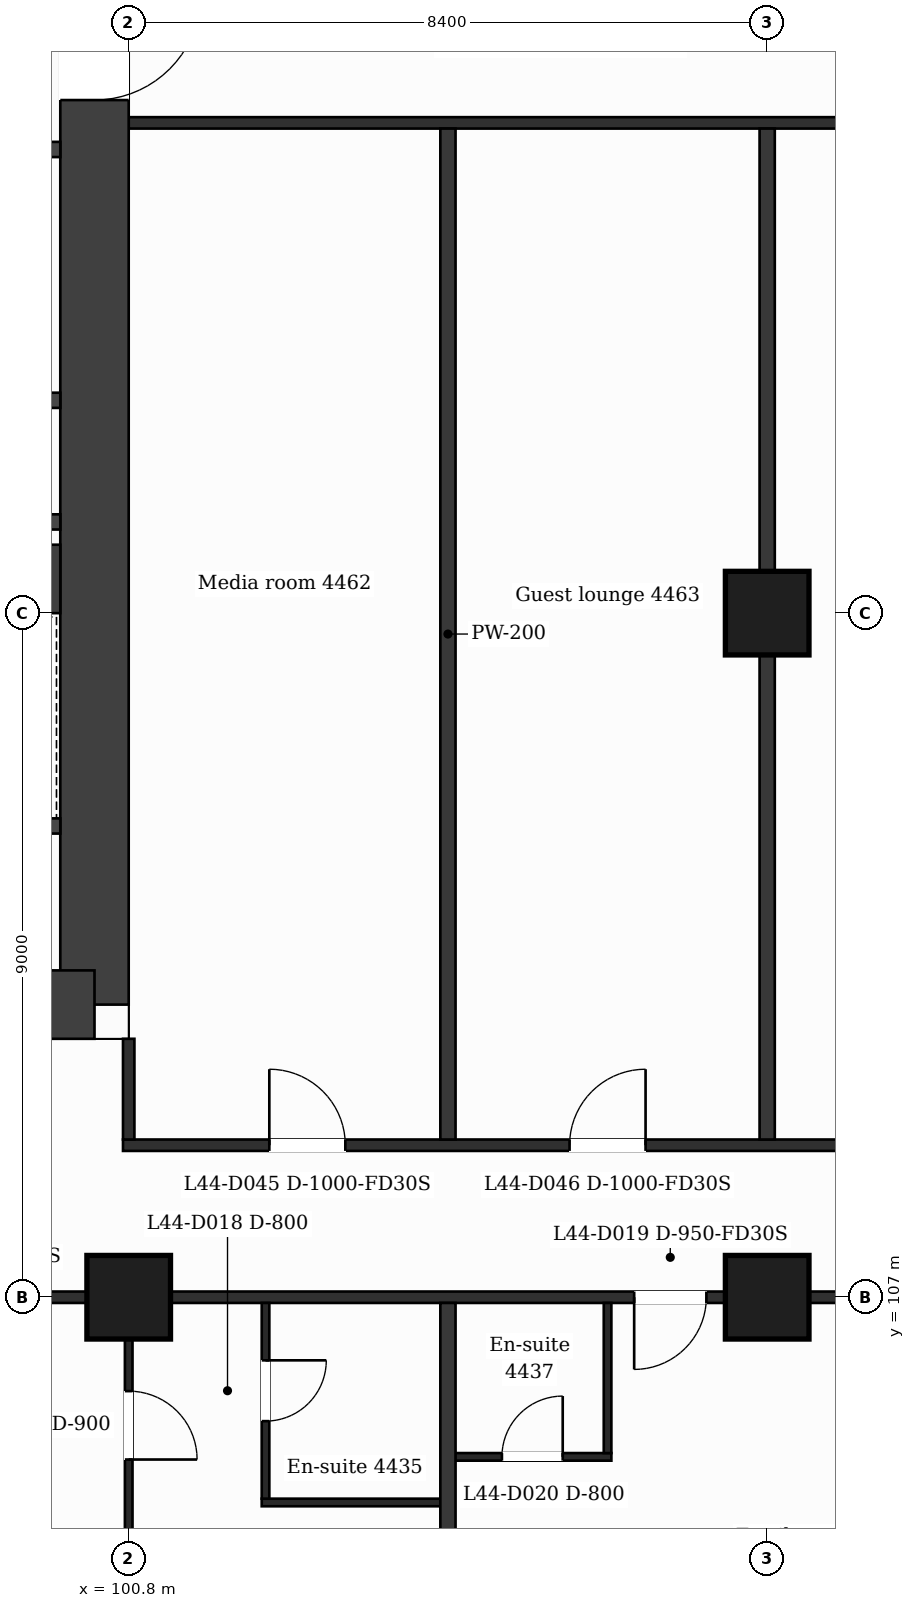
"""IFC4 building model, lengths in metres.
Left out: names, types, materials, properties, quantities, classifications, styles, units other than length and angle.
Written with IfcOpenShell. Run it as: python <this file> out.ifc"""

import sys

from ifc_helpers import new_model, si_unit, direction, frame, frame_2d, origin, origin_2d, place, context, subcontext, project, spatial, rectangle, extrude, element, fill, save


model = new_model("IFC4")
c1 = context("Model", 3, precision=1e-05, world=origin(), true_north=direction((0.0, 1.0)))
c2 = subcontext(c1, "Body", "Model", "MODEL_VIEW")
j1 = project(units=[si_unit("LENGTHUNIT", "METRE"), si_unit("PLANEANGLEUNIT", "RADIAN")], contexts=[c1])
p1 = place(None, origin())
s1 = spatial("IfcSite", under=j1, at=p1, CompositionType="ELEMENT")
p2 = place(p1, origin())
s2 = spatial("IfcBuilding", under=s1, at=p2, CompositionType="ELEMENT")
p3 = place(p2, frame((0.0, 0.0, 184.8)))
s3 = spatial("IfcBuildingStorey", under=s2, at=p3, CompositionType="ELEMENT", Elevation=184.8)
p4 = place(p3, frame((100.35, 131.95, 0.0), z_axis=(0.0, 0.0, 1.0), x_axis=(0.0, -1.0, 0.0)))
e1 = element("IfcWall", 1, at=p4, inside=s3, PredefinedType="SHEAR", context=c2, shape_type="SweptSolid", body=[
    extrude(rectangle(XDim=21.1, YDim=0.9, at=frame_2d((10.55, 0.0))), origin(), (0.0, 0.0, 1.0), 3.7),
])
p5 = place(p4, frame((7.8, 0.0, 0.0)))
e2 = element("IfcOpeningElement", 2, at=p5, cuts=e1, PredefinedType="OPENING", context=c2, shape_type="SweptSolid", body=[
    extrude(rectangle(XDim=1.4, YDim=2.1, at=frame_2d((0.7, 1.05))), frame((0.0, 0.46, 0.0), z_axis=(0.0, -1.0, 0.0), x_axis=(1.0, 0.0, 0.0)), (0.0, 0.0, 1.0), 0.92),
])
p6 = place(p3, frame((100.35, 110.85, 0.0), z_axis=(0.0, 0.0, 1.0), x_axis=(-1.0, 0.0, 0.0)))
e3 = element("IfcWall", 3, at=p6, inside=s3, PredefinedType="SHEAR", context=c2, shape_type="SweptSolid", body=[
    extrude(rectangle(XDim=14.166, YDim=0.9, at=frame_2d((7.083, 0.0))), origin(), (0.0, 0.0, 1.0), 3.7),
])
p7 = place(p6, frame((5.855, 0.0, 0.0)))
e4 = element("IfcOpeningElement", 4, at=p7, cuts=e3, PredefinedType="OPENING", context=c2, shape_type="SweptSolid", body=[
    extrude(rectangle(XDim=1.4, YDim=2.1, at=frame_2d((0.7, 1.05))), frame((0.0, 0.46, 0.0), z_axis=(0.0, -1.0, 0.0), x_axis=(1.0, 0.0, 0.0)), (0.0, 0.0, 1.0), 0.92),
])
p8 = place(p3, frame((94.8, 116.45, 0.0), z_axis=(0.0, 0.0, 1.0), x_axis=(1.0, 0.0, 0.0)))
e5 = element("IfcWall", 5, at=p8, inside=s3, PredefinedType="SHEAR", context=c2, shape_type="SweptSolid", body=[
    extrude(rectangle(XDim=5.1, YDim=0.9, at=frame_2d((2.55, 0.0))), origin(), (0.0, 0.0, 1.0), 3.7),
])
for number, where, z_axis, x_axis in (
    (6, (100.8, 107.0, 0.0), (0.0, 0.0, 1.0), (1.0, 0.0, 0.0)),
    (7, (109.2, 107.0, 0.0), (0.0, 0.0, 1.0), (1.0, 0.0, 0.0)),
    (8, (109.2, 116.0, 0.0), (0.0, 0.0, 1.0), (1.0, 0.0, 0.0)),
):
    element("IfcColumn", number, at=place(p3, frame(where, z_axis=z_axis, x_axis=x_axis)), inside=s3, PredefinedType="COLUMN", context=c2, shape_type="SweptSolid", body=[
        extrude(rectangle(XDim=1.1, YDim=1.1, at=origin_2d()), origin(), (0.0, 0.0, 1.0), 3.7),
    ])
p9 = place(p3, frame((102.55, 104.3, 0.0), z_axis=(0.0, 0.0, 1.0), x_axis=(1.0, 0.0, 0.0)))
e9 = element("IfcWall", 9, at=p9, inside=s3, PredefinedType="PARTITIONING", context=c2, shape_type="SweptSolid", body=[
    extrude(rectangle(XDim=2.45, YDim=0.1, at=frame_2d((1.225, 0.0))), origin(), (0.0, 0.0, 1.0), 3.38),
])
p10 = place(p3, frame((105.0, 104.9, 0.0), z_axis=(0.0, 0.0, 1.0), x_axis=(1.0, 0.0, 0.0)))
e10 = element("IfcWall", 10, at=p10, inside=s3, PredefinedType="PARTITIONING", context=c2, shape_type="SweptSolid", body=[
    extrude(rectangle(XDim=2.15, YDim=0.1, at=frame_2d((1.075, 0.0))), origin(), (0.0, 0.0, 1.0), 3.38),
])
p11 = place(p10, frame((0.71, 0.0, 0.0)))
e11 = element("IfcOpeningElement", 11, at=p11, cuts=e10, PredefinedType="OPENING", context=c2, shape_type="SweptSolid", body=[
    extrude(rectangle(XDim=0.8, YDim=2.1, at=frame_2d((0.4, 1.05))), frame((0.0, 0.06, 0.0), z_axis=(0.0, -1.0, 0.0), x_axis=(1.0, 0.0, 0.0)), (0.0, 0.0, 1.0), 0.12),
])
p12 = place(p3, frame((87.018, 107.0, 0.0), z_axis=(0.0, 0.0, 1.0), x_axis=(1.0, 0.0, 0.0)))
e12 = element("IfcWall", 12, at=p12, inside=s3, PredefinedType="PARTITIONING", context=c2, shape_type="SweptSolid", body=[
    extrude(rectangle(XDim=52.765, YDim=0.15, at=frame_2d((26.382, 0.0))), origin(), (0.0, 0.0, 1.0), 3.38),
])
p13 = place(p12, frame((0.87, 0.0, 0.0)))
e13 = element("IfcOpeningElement", 13, at=p13, cuts=e12, PredefinedType="OPENING", context=c2, shape_type="SweptSolid", body=[
    extrude(rectangle(XDim=0.95, YDim=2.1, at=frame_2d((0.475, 1.05))), frame((0.0, 0.085, 0.0), z_axis=(0.0, -1.0, 0.0), x_axis=(1.0, 0.0, 0.0)), (0.0, 0.0, 1.0), 0.17),
])
p14 = place(p12, frame((10.757, 0.0, 0.0)))
e14 = element("IfcOpeningElement", 14, at=p14, cuts=e12, PredefinedType="OPENING", context=c2, shape_type="SweptSolid", body=[
    extrude(rectangle(XDim=1.0, YDim=2.1, at=frame_2d((0.5, 1.05))), frame((0.0, 0.085, 0.0), z_axis=(0.0, -1.0, 0.0), x_axis=(1.0, 0.0, 0.0)), (0.0, 0.0, 1.0), 0.17),
])
p15 = place(p12, frame((20.432, 0.0, 0.0)))
e15 = element("IfcOpeningElement", 15, at=p15, cuts=e12, PredefinedType="OPENING", context=c2, shape_type="SweptSolid", body=[
    extrude(rectangle(XDim=0.95, YDim=2.1, at=frame_2d((0.475, 1.05))), frame((0.0, 0.085, 0.0), z_axis=(0.0, -1.0, 0.0), x_axis=(1.0, 0.0, 0.0)), (0.0, 0.0, 1.0), 0.17),
])
p16 = place(p12, frame((27.752, 0.0, 0.0)))
e16 = element("IfcOpeningElement", 16, at=p16, cuts=e12, PredefinedType="OPENING", context=c2, shape_type="SweptSolid", body=[
    extrude(rectangle(XDim=0.95, YDim=2.1, at=frame_2d((0.475, 1.05))), frame((0.0, 0.085, 0.0), z_axis=(0.0, -1.0, 0.0), x_axis=(1.0, 0.0, 0.0)), (0.0, 0.0, 1.0), 0.17),
])
p17 = place(p12, frame((33.557, 0.0, 0.0)))
e17 = element("IfcOpeningElement", 17, at=p17, cuts=e12, PredefinedType="OPENING", context=c2, shape_type="SweptSolid", body=[
    extrude(rectangle(XDim=0.95, YDim=2.1, at=frame_2d((0.475, 1.05))), frame((0.0, 0.085, 0.0), z_axis=(0.0, -1.0, 0.0), x_axis=(1.0, 0.0, 0.0)), (0.0, 0.0, 1.0), 0.17),
])
p18 = place(p12, frame((35.057, 0.0, 0.0)))
e18 = element("IfcOpeningElement", 18, at=p18, cuts=e12, PredefinedType="OPENING", context=c2, shape_type="SweptSolid", body=[
    extrude(rectangle(XDim=0.95, YDim=2.1, at=frame_2d((0.475, 1.05))), frame((0.0, 0.085, 0.0), z_axis=(0.0, -1.0, 0.0), x_axis=(1.0, 0.0, 0.0)), (0.0, 0.0, 1.0), 0.17),
])
p19 = place(p12, frame((45.407, 0.0, 0.0)))
e19 = element("IfcOpeningElement", 19, at=p19, cuts=e12, PredefinedType="OPENING", context=c2, shape_type="SweptSolid", body=[
    extrude(rectangle(XDim=1.0, YDim=2.1, at=frame_2d((0.5, 1.05))), frame((0.0, 0.085, 0.0), z_axis=(0.0, -1.0, 0.0), x_axis=(1.0, 0.0, 0.0)), (0.0, 0.0, 1.0), 0.17),
])
p20 = place(p12, frame((49.285, 0.0, 0.0)))
e20 = element("IfcOpeningElement", 20, at=p20, cuts=e12, PredefinedType="OPENING", context=c2, shape_type="SweptSolid", body=[
    extrude(rectangle(XDim=0.95, YDim=2.1, at=frame_2d((0.475, 1.05))), frame((0.0, 0.085, 0.0), z_axis=(0.0, -1.0, 0.0), x_axis=(1.0, 0.0, 0.0)), (0.0, 0.0, 1.0), 0.17),
])
p21 = place(p3, frame((100.725, 109.0, 0.0), z_axis=(0.0, 0.0, 1.0), x_axis=(1.0, 0.0, 0.0)))
e21 = element("IfcWall", 21, at=p21, inside=s3, PredefinedType="PARTITIONING", context=c2, shape_type="SweptSolid", body=[
    extrude(rectangle(XDim=25.35, YDim=0.15, at=frame_2d((12.675, 0.0))), origin(), (0.0, 0.0, 1.0), 3.38),
])
p22 = place(p21, frame((1.925, 0.0, 0.0)))
e22 = element("IfcOpeningElement", 22, at=p22, cuts=e21, PredefinedType="OPENING", context=c2, shape_type="SweptSolid", body=[
    extrude(rectangle(XDim=1.0, YDim=2.1, at=frame_2d((0.5, 1.05))), frame((0.0, 0.085, 0.0), z_axis=(0.0, -1.0, 0.0), x_axis=(1.0, 0.0, 0.0)), (0.0, 0.0, 1.0), 0.17),
])
p23 = place(p21, frame((5.875, 0.0, 0.0)))
e23 = element("IfcOpeningElement", 23, at=p23, cuts=e21, PredefinedType="OPENING", context=c2, shape_type="SweptSolid", body=[
    extrude(rectangle(XDim=1.0, YDim=2.1, at=frame_2d((0.5, 1.05))), frame((0.0, 0.085, 0.0), z_axis=(0.0, -1.0, 0.0), x_axis=(1.0, 0.0, 0.0)), (0.0, 0.0, 1.0), 0.17),
])
p24 = place(p21, frame((12.845, 0.0, 0.0)))
e24 = element("IfcOpeningElement", 24, at=p24, cuts=e21, PredefinedType="OPENING", context=c2, shape_type="SweptSolid", body=[
    extrude(rectangle(XDim=1.0, YDim=2.1, at=frame_2d((0.5, 1.05))), frame((0.0, 0.085, 0.0), z_axis=(0.0, -1.0, 0.0), x_axis=(1.0, 0.0, 0.0)), (0.0, 0.0, 1.0), 0.17),
])
p25 = place(p21, frame((22.25, 0.0, 0.0)))
e25 = element("IfcOpeningElement", 25, at=p25, cuts=e21, PredefinedType="OPENING", context=c2, shape_type="SweptSolid", body=[
    extrude(rectangle(XDim=1.0, YDim=2.1, at=frame_2d((0.5, 1.05))), frame((0.0, 0.085, 0.0), z_axis=(0.0, -1.0, 0.0), x_axis=(1.0, 0.0, 0.0)), (0.0, 0.0, 1.0), 0.17),
])
p26 = place(p3, frame((95.127, 113.2, 0.0), z_axis=(0.0, 0.0, 1.0), x_axis=(1.0, 0.0, 0.0)))
e26 = element("IfcWall", 26, at=p26, inside=s3, PredefinedType="PARTITIONING", context=c2, shape_type="SweptSolid", body=[
    extrude(rectangle(XDim=4.773, YDim=0.2, at=frame_2d((2.386, 0.0))), origin(), (0.0, 0.0, 1.0), 3.38),
])
p27 = place(p26, frame((3.001, 0.0, 0.0)))
e27 = element("IfcOpeningElement", 27, at=p27, cuts=e26, PredefinedType="OPENING", context=c2, shape_type="SweptSolid", body=[
    extrude(rectangle(XDim=1.1, YDim=2.1, at=frame_2d((0.55, 1.05))), frame((0.0, 0.11, 0.0), z_axis=(0.0, -1.0, 0.0), x_axis=(1.0, 0.0, 0.0)), (0.0, 0.0, 1.0), 0.22),
])
for number, where, z_axis, x_axis in (
    (28, (95.227, 117.2, 0.0), (0.0, 0.0, 1.0), (1.0, 0.0, 0.0)),
    (29, (95.227, 118.8, 0.0), (0.0, 0.0, 1.0), (1.0, 0.0, 0.0)),
):
    element("IfcWall", number, at=place(p3, frame(where, z_axis=z_axis, x_axis=x_axis)), inside=s3, PredefinedType="PARTITIONING", context=c2, shape_type="SweptSolid", body=[
        extrude(rectangle(XDim=4.673, YDim=0.2, at=frame_2d((2.336, 0.0))), origin(), (0.0, 0.0, 1.0), 3.38),
    ])
p28 = place(p3, frame((95.227, 122.1, 0.0), z_axis=(0.0, 0.0, 1.0), x_axis=(1.0, 0.0, 0.0)))
e30 = element("IfcWall", 30, at=p28, inside=s3, PredefinedType="PARTITIONING", context=c2, shape_type="SweptSolid", body=[
    extrude(rectangle(XDim=4.673, YDim=0.2, at=frame_2d((2.336, 0.0))), origin(), (0.0, 0.0, 1.0), 3.38),
])
p29 = place(p28, frame((1.579, 0.0, 0.0)))
e31 = element("IfcOpeningElement", 31, at=p29, cuts=e30, PredefinedType="OPENING", context=c2, shape_type="SweptSolid", body=[
    extrude(rectangle(XDim=0.9, YDim=2.1, at=frame_2d((0.45, 1.05))), frame((0.0, 0.11, 0.0), z_axis=(0.0, -1.0, 0.0), x_axis=(1.0, 0.0, 0.0)), (0.0, 0.0, 1.0), 0.22),
])
p30 = place(p3, frame((100.8, 122.45, 0.0), z_axis=(0.0, 0.0, 1.0), x_axis=(1.0, 0.0, 0.0)))
e32 = element("IfcWall", 32, at=p30, inside=s3, PredefinedType="PARTITIONING", context=c2, shape_type="SweptSolid", body=[
    extrude(rectangle(XDim=25.2, YDim=0.15, at=frame_2d((12.6, 0.0))), origin(), (0.0, 0.0, 1.0), 3.38),
])
p31 = place(p3, frame((100.8, 99.79, 0.0), z_axis=(0.0, 0.0, 1.0), x_axis=(0.0, 1.0, 0.0)))
e33 = element("IfcWall", 33, at=p31, inside=s3, PredefinedType="PARTITIONING", context=c2, shape_type="SweptSolid", body=[
    extrude(rectangle(XDim=7.135, YDim=0.1, at=frame_2d((3.567, 0.0))), origin(), (0.0, 0.0, 1.0), 3.38),
])
p32 = place(p31, frame((5.075, 0.0, 0.0)))
e34 = element("IfcOpeningElement", 34, at=p32, cuts=e33, PredefinedType="OPENING", context=c2, shape_type="SweptSolid", body=[
    extrude(rectangle(XDim=0.9, YDim=2.1, at=frame_2d((0.45, 1.05))), frame((0.0, 0.06, 0.0), z_axis=(0.0, -1.0, 0.0), x_axis=(1.0, 0.0, 0.0)), (0.0, 0.0, 1.0), 0.12),
])
p33 = place(p3, frame((100.8, 109.075, 0.0), z_axis=(0.0, 0.0, 1.0), x_axis=(0.0, 1.0, 0.0)))
e35 = element("IfcWall", 35, at=p33, inside=s3, PredefinedType="PARTITIONING", context=c2, shape_type="SweptSolid", body=[
    extrude(rectangle(XDim=1.325, YDim=0.15, at=frame_2d((0.663, 0.0))), origin(), (0.0, 0.0, 1.0), 3.38),
])
p34 = place(p3, frame((102.6, 104.35, 0.0), z_axis=(0.0, 0.0, 1.0), x_axis=(0.0, 1.0, 0.0)))
e36 = element("IfcWall", 36, at=p34, inside=s3, PredefinedType="PARTITIONING", context=c2, shape_type="SweptSolid", body=[
    extrude(rectangle(XDim=2.575, YDim=0.1, at=frame_2d((1.288, 0.0))), origin(), (0.0, 0.0, 1.0), 3.38),
])
p35 = place(p34, frame((1.02, 0.0, 0.0)))
e37 = element("IfcOpeningElement", 37, at=p35, cuts=e36, PredefinedType="OPENING", context=c2, shape_type="SweptSolid", body=[
    extrude(rectangle(XDim=0.8, YDim=2.1, at=frame_2d((0.4, 1.05))), frame((0.0, 0.06, 0.0), z_axis=(0.0, -1.0, 0.0), x_axis=(1.0, 0.0, 0.0)), (0.0, 0.0, 1.0), 0.12),
])
p36 = place(p3, frame((105.0, 99.79, 0.0), z_axis=(0.0, 0.0, 1.0), x_axis=(0.0, 1.0, 0.0)))
e38 = element("IfcWall", 38, at=p36, inside=s3, PredefinedType="PARTITIONING", context=c2, shape_type="SweptSolid", body=[
    extrude(rectangle(XDim=7.135, YDim=0.2, at=frame_2d((3.567, 0.0))), origin(), (0.0, 0.0, 1.0), 3.38),
])
p37 = place(p3, frame((105.0, 109.075, 0.0), z_axis=(0.0, 0.0, 1.0), x_axis=(0.0, 1.0, 0.0)))
e39 = element("IfcWall", 39, at=p37, inside=s3, PredefinedType="PARTITIONING", context=c2, shape_type="SweptSolid", body=[
    extrude(rectangle(XDim=13.3, YDim=0.2, at=frame_2d((6.65, 0.0))), origin(), (0.0, 0.0, 1.0), 3.38),
])
p38 = place(p3, frame((107.1, 104.95, 0.0), z_axis=(0.0, 0.0, 1.0), x_axis=(0.0, 1.0, 0.0)))
e40 = element("IfcWall", 40, at=p38, inside=s3, PredefinedType="PARTITIONING", context=c2, shape_type="SweptSolid", body=[
    extrude(rectangle(XDim=1.975, YDim=0.1, at=frame_2d((0.988, 0.0))), origin(), (0.0, 0.0, 1.0), 3.38),
])
p39 = place(p3, frame((109.2, 109.075, 0.0), z_axis=(0.0, 0.0, 1.0), x_axis=(0.0, 1.0, 0.0)))
e41 = element("IfcWall", 41, at=p39, inside=s3, PredefinedType="PARTITIONING", context=c2, shape_type="SweptSolid", body=[
    extrude(rectangle(XDim=13.3, YDim=0.2, at=frame_2d((6.65, 0.0))), origin(), (0.0, 0.0, 1.0), 3.38),
])
p40 = place(p32, origin())
e42 = element("IfcDoor", 42, at=p40, inside=s3, OperationType="SINGLE_SWING_LEFT", PredefinedType="DOOR", context=c2, shape_type="SweptSolid", body=[
    extrude(rectangle(XDim=0.9, YDim=2.1, at=frame_2d((0.45, 1.05))), frame((0.0, 0.025, 0.0), z_axis=(0.0, -1.0, 0.0), x_axis=(1.0, 0.0, 0.0)), (0.0, 0.0, 1.0), 0.05),
])
fill(e34, e42)
p41 = place(p35, origin())
e43 = element("IfcDoor", 43, at=p41, inside=s3, OperationType="SINGLE_SWING_RIGHT", PredefinedType="DOOR", context=c2, shape_type="SweptSolid", body=[
    extrude(rectangle(XDim=0.8, YDim=2.1, at=frame_2d((0.4, 1.05))), frame((0.0, 0.025, 0.0), z_axis=(0.0, -1.0, 0.0), x_axis=(1.0, 0.0, 0.0)), (0.0, 0.0, 1.0), 0.05),
])
fill(e37, e43)
p42 = place(p15, origin())
e44 = element("IfcDoor", 44, at=p42, inside=s3, OperationType="SINGLE_SWING_LEFT", PredefinedType="DOOR", context=c2, shape_type="SweptSolid", body=[
    extrude(rectangle(XDim=0.95, YDim=2.1, at=frame_2d((0.475, 1.05))), frame((0.0, 0.025, 0.0), z_axis=(0.0, -1.0, 0.0), x_axis=(1.0, 0.0, 0.0)), (0.0, 0.0, 1.0), 0.05),
])
fill(e15, e44)
p43 = place(p11, origin())
e45 = element("IfcDoor", 45, at=p43, inside=s3, OperationType="SINGLE_SWING_RIGHT", PredefinedType="DOOR", context=c2, shape_type="SweptSolid", body=[
    extrude(rectangle(XDim=0.8, YDim=2.1, at=frame_2d((0.4, 1.05))), frame((0.0, 0.025, 0.0), z_axis=(0.0, -1.0, 0.0), x_axis=(1.0, 0.0, 0.0)), (0.0, 0.0, 1.0), 0.05),
])
fill(e11, e45)
p44 = place(p22, origin())
e46 = element("IfcDoor", 46, at=p44, inside=s3, OperationType="SINGLE_SWING_LEFT", PredefinedType="DOOR", context=c2, shape_type="SweptSolid", body=[
    extrude(rectangle(XDim=1.0, YDim=2.1, at=frame_2d((0.5, 1.05))), frame((0.0, 0.025, 0.0), z_axis=(0.0, -1.0, 0.0), x_axis=(1.0, 0.0, 0.0)), (0.0, 0.0, 1.0), 0.05),
])
fill(e22, e46)
p45 = place(p23, origin())
e47 = element("IfcDoor", 47, at=p45, inside=s3, OperationType="SINGLE_SWING_RIGHT", PredefinedType="DOOR", context=c2, shape_type="SweptSolid", body=[
    extrude(rectangle(XDim=1.0, YDim=2.1, at=frame_2d((0.5, 1.05))), frame((0.0, 0.025, 0.0), z_axis=(0.0, -1.0, 0.0), x_axis=(1.0, 0.0, 0.0)), (0.0, 0.0, 1.0), 0.05),
])
fill(e23, e47)
p46 = place(p5, origin())
e48 = element("IfcDoor", 48, at=p46, inside=s3, OperationType="SINGLE_SWING_LEFT", PredefinedType="DOOR", context=c2, shape_type="SweptSolid", body=[
    extrude(rectangle(XDim=1.4, YDim=2.1, at=frame_2d((0.7, 1.05))), frame((0.0, 0.025, 0.0), z_axis=(0.0, -1.0, 0.0), x_axis=(1.0, 0.0, 0.0)), (0.0, 0.0, 1.0), 0.05),
])
fill(e2, e48)
save(model, sys.argv[1])
